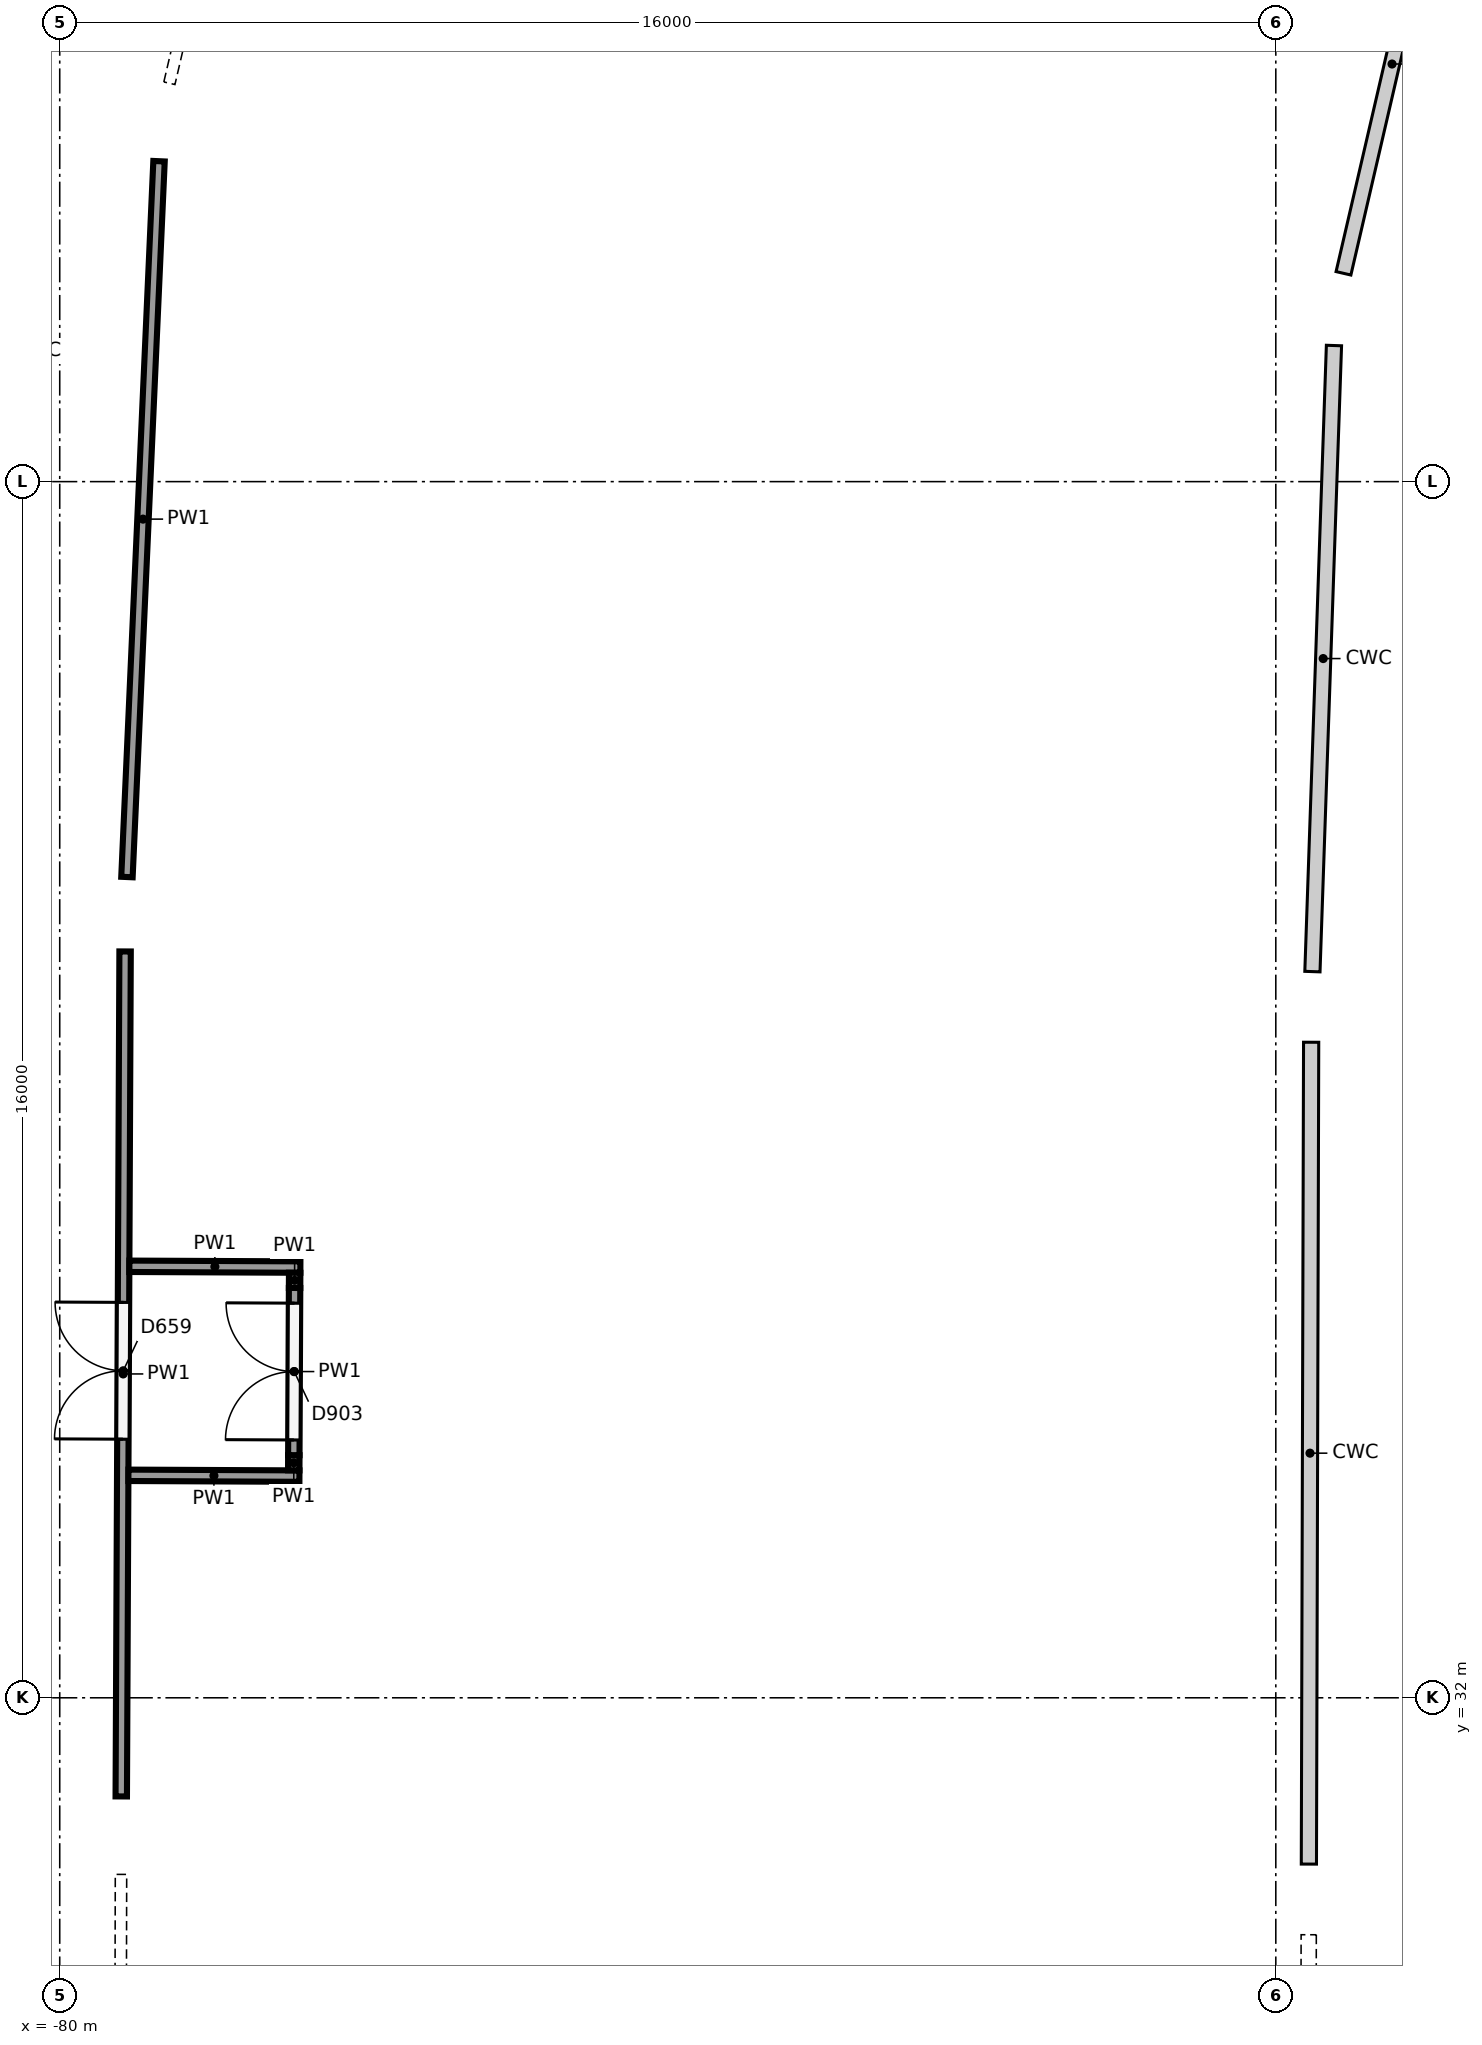
"""IFC4 building model, lengths in metres.
Left out: names, types, materials, properties, quantities, classifications, styles, units other than length and angle.
Written with IfcOpenShell. Run it as: python <this file> out.ifc"""

import sys

from ifc_helpers import new_model, si_unit, direction, frame, frame_2d, origin, origin_2d, place, context, subcontext, project, spatial, rectangle, circle, extrude, element, fill, save


model = new_model("IFC4")
c1 = context("Model", 3, precision=1e-05, world=origin(), true_north=direction((0.0, 1.0)))
c2 = subcontext(c1, "Body", "Model", "MODEL_VIEW")
j1 = project(units=[si_unit("LENGTHUNIT", "METRE"), si_unit("PLANEANGLEUNIT", "RADIAN")], contexts=[c1])
p1 = place(None, origin())
s1 = spatial("IfcSite", under=j1, at=p1, CompositionType="ELEMENT")
p2 = place(p1, origin())
s2 = spatial("IfcBuilding", under=s1, at=p2, CompositionType="ELEMENT")
p3 = place(p2, frame((0.0, 0.0, 6.5)))
s3 = spatial("IfcBuildingStorey", under=s2, at=p3, CompositionType="ELEMENT", Elevation=6.5)
p4 = place(p3, frame((-63.218, 50.273, 0.0), z_axis=(0.0, 0.0, 1.0), x_axis=(1.0, 0.0, 0.0)))
e1 = element("IfcColumn", 1, at=p4, inside=s3, PredefinedType="COLUMN", context=c2, shape_type="SweptSolid", body=[
    extrude(circle(Radius=0.45, at=origin_2d()), origin(), (0.0, 0.0, 1.0), 5.5),
])
p5 = place(p3, frame((-64.502, 50.48, 0.0), z_axis=(0.0, 0.0, 1.0), x_axis=(1.0, 0.0, 0.0)))
e2 = element("IfcColumn", 2, at=p5, inside=s3, PredefinedType="COLUMN", context=c2, shape_type="SweptSolid", body=[
    extrude(circle(Radius=0.4, at=origin_2d()), origin(), (0.0, 0.0, 1.0), 5.5),
])
for number, where, z_axis, x_axis in (
    (3, (-72.992, 51.847, 0.0), (0.0, 0.0, 1.0), (1.0, 0.0, 0.0)),
    (4, (-63.534, 41.104, 0.0), (0.0, 0.0, 1.0), (1.0, 0.0, 0.0)),
):
    element("IfcColumn", number, at=place(p3, frame(where, z_axis=z_axis, x_axis=x_axis)), inside=s3, PredefinedType="COLUMN", context=c2, shape_type="SweptSolid", body=[
        extrude(circle(Radius=0.45, at=origin_2d()), origin(), (0.0, 0.0, 1.0), 5.5),
    ])
p6 = place(p3, frame((-64.83, 41.204, 0.0), z_axis=(0.0, 0.0, 1.0), x_axis=(1.0, 0.0, 0.0)))
e5 = element("IfcColumn", 5, at=p6, inside=s3, PredefinedType="COLUMN", context=c2, shape_type="SweptSolid", body=[
    extrude(circle(Radius=0.4, at=origin_2d()), origin(), (0.0, 0.0, 1.0), 5.5),
])
for number, where, z_axis, x_axis in (
    (6, (-73.405, 41.862, 0.0), (0.0, 0.0, 1.0), (1.0, 0.0, 0.0)),
    (7, (-63.566, 29.362, 0.0), (0.0, 0.0, 1.0), (1.0, 0.0, 0.0)),
):
    element("IfcColumn", number, at=place(p3, frame(where, z_axis=z_axis, x_axis=x_axis)), inside=s3, PredefinedType="COLUMN", context=c2, shape_type="SweptSolid", body=[
        extrude(circle(Radius=0.45, at=origin_2d()), origin(), (0.0, 0.0, 1.0), 5.5),
    ])
p7 = place(p3, frame((-64.864, 29.433, 0.0), z_axis=(0.0, 0.0, 1.0), x_axis=(1.0, 0.0, 0.0)))
e8 = element("IfcColumn", 8, at=p7, inside=s3, PredefinedType="COLUMN", context=c2, shape_type="SweptSolid", body=[
    extrude(circle(Radius=0.4, at=origin_2d()), origin(), (0.0, 0.0, 1.0), 5.5),
])
p8 = place(p3, frame((-73.451, 29.904, 0.0), z_axis=(0.0, 0.0, 1.0), x_axis=(1.0, 0.0, 0.0)))
e9 = element("IfcColumn", 9, at=p8, inside=s3, PredefinedType="COLUMN", context=c2, shape_type="SweptSolid", body=[
    extrude(circle(Radius=0.45, at=origin_2d()), origin(), (0.0, 0.0, 1.0), 5.5),
])
p9 = place(p3, frame((-78.557, 53.241, 0.0), z_axis=(0.0, 0.0, 1.0), x_axis=(0.226944673482, 0.973907652284, 0.0)))
e10 = element("IfcWall", 10, at=p9, inside=s3, PredefinedType="PARTITIONING", context=c2, shape_type="SweptSolid", body=[
    extrude(rectangle(XDim=7.882, YDim=0.15, at=frame_2d((3.941, 0.0))), origin(), (0.0, 0.0, 1.0), 5.15),
])
p10 = place(p9, frame((3.45, 0.0, 0.0)))
e11 = element("IfcOpeningElement", 11, at=p10, cuts=e10, PredefinedType="OPENING", context=c2, shape_type="SweptSolid", body=[
    extrude(rectangle(XDim=1.2, YDim=2.1, at=frame_2d((0.6, 1.05))), frame((0.0, 0.085, 0.0), z_axis=(0.0, -1.0, 0.0), x_axis=(1.0, 0.0, 0.0)), (0.0, 0.0, 1.0), 0.17),
])
p11 = place(p3, frame((-79.19, 30.702, 0.0), z_axis=(0.0, 0.0, 1.0), x_axis=(0.004546006523, 0.999989666859, 0.0)))
e12 = element("IfcWall", 12, at=p11, inside=s3, PredefinedType="PARTITIONING", context=c2, shape_type="SweptSolid", body=[
    extrude(rectangle(XDim=11.117, YDim=0.15, at=frame_2d((5.558, 0.0))), origin(), (0.0, 0.0, 1.0), 5.15),
])
p12 = place(p11, frame((4.7, 0.0, 0.0)))
e13 = element("IfcOpeningElement", 13, at=p12, cuts=e12, PredefinedType="OPENING", context=c2, shape_type="SweptSolid", body=[
    extrude(rectangle(XDim=1.8, YDim=2.1, at=frame_2d((0.9, 1.05))), frame((0.0, 0.085, 0.0), z_axis=(0.0, -1.0, 0.0), x_axis=(1.0, 0.0, 0.0)), (0.0, 0.0, 1.0), 0.17),
])
p13 = place(p3, frame((-79.115, 42.798, 0.0), z_axis=(0.0, 0.0, 1.0), x_axis=(0.044750974556, 0.99899817331, 0.0)))
e14 = element("IfcWall", 14, at=p13, inside=s3, PredefinedType="PARTITIONING", context=c2, shape_type="SweptSolid", body=[
    extrude(rectangle(XDim=9.427, YDim=0.15, at=frame_2d((4.714, 0.0))), origin(), (0.0, 0.0, 1.0), 5.15),
])
p14 = place(p3, frame((-79.219, 18.845, 0.0), z_axis=(0.0, 0.0, 1.0), x_axis=(0.002254023351, 0.999997459686, 0.0)))
e15 = element("IfcWall", 15, at=p14, inside=s3, PredefinedType="PARTITIONING", context=c2, shape_type="SweptSolid", body=[
    extrude(rectangle(XDim=10.831, YDim=0.15, at=frame_2d((5.416, 0.0))), origin(), (0.0, 0.0, 1.0), 5.15),
])
p15 = place(p3, frame((-81.513, 47.012, 0.0), z_axis=(0.0, 0.0, 1.0), x_axis=(0.111965089533, 0.993712140776, 0.0)))
e16 = element("IfcWall", 16, at=p15, inside=s3, PredefinedType="PARTITIONING", context=c2, shape_type="SweptSolid", body=[
    extrude(rectangle(XDim=13.89, YDim=0.15, at=frame_2d((6.945, 0.0))), origin(), (0.0, 0.0, 1.0), 4.05),
])
p16 = place(p15, frame((7.75, 0.0, 0.0)))
e17 = element("IfcOpeningElement", 17, at=p16, cuts=e16, PredefinedType="OPENING", context=c2, shape_type="SweptSolid", body=[
    extrude(rectangle(XDim=1.8, YDim=2.1, at=frame_2d((0.9, 1.05))), frame((0.0, 0.085, 0.0), z_axis=(0.0, -1.0, 0.0), x_axis=(1.0, 0.0, 0.0)), (0.0, 0.0, 1.0), 0.17),
])
for number, where, z_axis, x_axis in (
    (18, (-79.096, 34.927, 0.0), (0.0, 0.0, 1.0), (1.0, -0.005, 0.0)),
    (19, (-79.084, 37.677, 0.0), (0.0, 0.0, 1.0), (1.0, -0.005, 0.0)),
):
    element("IfcWall", number, at=place(p3, frame(where, z_axis=z_axis, x_axis=x_axis)), inside=s3, PredefinedType="PARTITIONING", context=c2, shape_type="SweptSolid", body=[
        extrude(rectangle(XDim=2.25, YDim=0.15, at=frame_2d((1.125, 0.0))), origin(), (0.0, 0.0, 1.0), 5.15),
    ])
p17 = place(p3, frame((-76.921, 34.992, 0.0), z_axis=(0.0, 0.0, 1.0), x_axis=(0.003662979089, 0.99999329127, 0.0)))
e20 = element("IfcWall", 20, at=p17, inside=s3, PredefinedType="PARTITIONING", context=c2, shape_type="SweptSolid", body=[
    extrude(rectangle(XDim=0.2, YDim=0.15, at=frame_2d((0.1, 0.0))), origin(), (0.0, 0.0, 1.0), 5.15),
])
p18 = place(p3, frame((-76.92, 35.192, 0.0), z_axis=(0.0, 0.0, 1.0), x_axis=(0.004549947354, 0.999989648936, 0.0)))
e21 = element("IfcWall", 21, at=p18, inside=s3, PredefinedType="PARTITIONING", context=c2, shape_type="SweptSolid", body=[
    extrude(rectangle(XDim=2.2, YDim=0.15, at=frame_2d((1.1, 0.0))), origin(), (0.0, 0.0, 1.0), 5.15),
])
p19 = place(p18, frame((0.2, 0.0, 0.0)))
e22 = element("IfcOpeningElement", 22, at=p19, cuts=e21, PredefinedType="OPENING", context=c2, shape_type="SweptSolid", body=[
    extrude(rectangle(XDim=1.8, YDim=2.1, at=frame_2d((0.9, 1.05))), frame((0.0, 0.085, 0.0), z_axis=(0.0, -1.0, 0.0), x_axis=(1.0, 0.0, 0.0)), (0.0, 0.0, 1.0), 0.17),
])
p20 = place(p3, frame((-76.91, 37.392, 0.0), z_axis=(0.0, 0.0, 1.0), x_axis=(0.004883946635, 0.999988073462, 0.0)))
e23 = element("IfcWall", 23, at=p20, inside=s3, PredefinedType="PARTITIONING", context=c2, shape_type="SweptSolid", body=[
    extrude(rectangle(XDim=0.2, YDim=0.15, at=frame_2d((0.1, 0.0))), origin(), (0.0, 0.0, 1.0), 5.15),
])
p21 = place(p12, origin())
e24 = element("IfcDoor", 24, at=p21, inside=s3, OperationType="DOUBLE_DOOR_SINGLE_SWING", PredefinedType="DOOR", context=c2, shape_type="SweptSolid", body=[
    extrude(rectangle(XDim=1.8, YDim=2.1, at=frame_2d((0.9, 1.05))), frame((0.0, 0.025, 0.0), z_axis=(0.0, -1.0, 0.0), x_axis=(1.0, 0.0, 0.0)), (0.0, 0.0, 1.0), 0.05),
])
fill(e13, e24)
p22 = place(p19, origin())
e25 = element("IfcDoor", 25, at=p22, inside=s3, OperationType="DOUBLE_DOOR_SINGLE_SWING", PredefinedType="DOOR", context=c2, shape_type="SweptSolid", body=[
    extrude(rectangle(XDim=1.8, YDim=2.1, at=frame_2d((0.9, 1.05))), frame((0.0, 0.025, 0.0), z_axis=(0.0, -1.0, 0.0), x_axis=(1.0, 0.0, 0.0)), (0.0, 0.0, 1.0), 0.05),
])
fill(e22, e25)
save(model, sys.argv[1])
